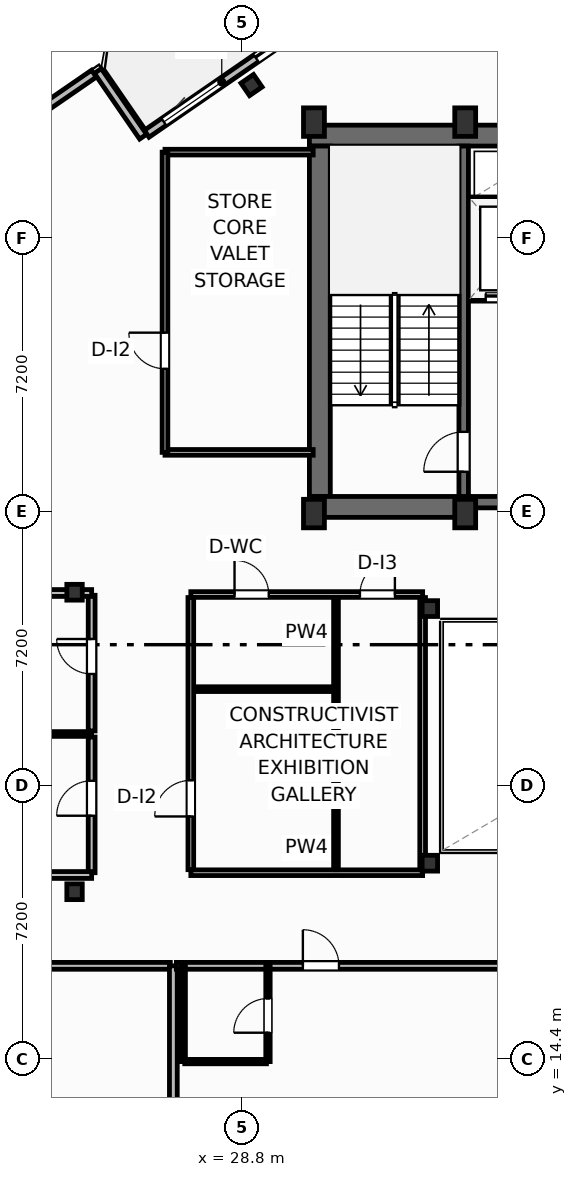
"""IFC4 building model, lengths in metres.
Left out: names, types, materials, properties, quantities, classifications, styles, units other than length and angle.
Written with IfcOpenShell. Run it as: python <this file> out.ifc"""

import sys

from ifc_helpers import new_model, si_unit, direction, frame, frame_2d, origin, origin_2d, place, context, subcontext, project, spatial, rectangle, i_section, extrude, element, fill, save


model = new_model("IFC4")
c1 = context("Model", 3, precision=1e-05, world=origin(), true_north=direction((0.0, 1.0)))
c2 = subcontext(c1, "Body", "Model", "MODEL_VIEW")
j1 = project(units=[si_unit("LENGTHUNIT", "METRE"), si_unit("PLANEANGLEUNIT", "RADIAN")], contexts=[c1])
p1 = place(None, origin())
s1 = spatial("IfcSite", under=j1, at=p1, CompositionType="ELEMENT")
p2 = place(p1, origin())
s2 = spatial("IfcBuilding", under=s1, at=p2, CompositionType="ELEMENT")
p3 = place(p2, frame((0.0, 0.0, 276.7)))
s3 = spatial("IfcBuildingStorey", under=s2, at=p3, CompositionType="ELEMENT", Elevation=276.7)
for number, where, z_axis, x_axis in (
    (1, (30.7, 28.75, 0.0), (0.0, 0.0, 1.0), (1.0, 0.0, 0.0)),
    (2, (34.68, 28.75, 0.0), (0.0, 0.0, 1.0), (1.0, 0.0, 0.0)),
    (3, (30.7, 39.05, 0.0), (0.0, 0.0, 1.0), (1.0, 0.0, 0.0)),
    (4, (34.68, 39.05, 0.0), (0.0, 0.0, 1.0), (1.0, 0.0, 0.0)),
):
    element("IfcColumn", number, at=place(p3, frame(where, z_axis=z_axis, x_axis=x_axis)), inside=s3, PredefinedType="COLUMN", context=c2, shape_type="SweptSolid", body=[
        extrude(rectangle(XDim=0.55, YDim=0.75, at=origin_2d()), origin(), (0.0, 0.0, 1.0), 3.7),
    ])
for number, where, z_axis, x_axis in (
    (5, (33.75, 19.55, 0.0), (0.0, 0.0, 1.0), (1.0, 0.0, 0.0)),
    (6, (33.75, 26.25, 0.0), (0.0, 0.0, 1.0), (1.0, 0.0, 0.0)),
    (7, (24.4, 18.8, 0.0), (0.0, 0.0, 1.0), (1.0, 0.0, 0.0)),
    (8, (24.4, 26.68, 0.0), (0.0, 0.0, 1.0), (1.0, 0.0, 0.0)),
):
    element("IfcColumn", number, at=place(p3, frame(where, z_axis=z_axis, x_axis=x_axis)), inside=s3, PredefinedType="COLUMN", context=c2, shape_type="SweptSolid", body=[
        extrude(i_section(OverallWidth=0.406, OverallDepth=0.416, WebThickness=0.03, FlangeThickness=0.048, FilletRadius=0.025, at=origin_2d()), origin(), (0.0, 0.0, 1.0), 3.7),
    ])
p4 = place(p3, frame((30.58, 38.695, 0.0), z_axis=(0.0, 0.0, 1.0), x_axis=(1.0, 0.0, 0.0)))
e9 = element("IfcWall", 9, at=p4, inside=s3, PredefinedType="SHEAR", context=c2, shape_type="SweptSolid", body=[
    extrude(rectangle(XDim=17.24, YDim=0.55, at=frame_2d((8.62, 0.0))), origin(), (0.0, 0.0, 1.0), 3.45),
])
p5 = place(p3, frame((30.855, 29.2, 0.0), z_axis=(0.0, 0.0, 1.0), x_axis=(0.0, 1.0, 0.0)))
e10 = element("IfcWall", 10, at=p5, inside=s3, PredefinedType="SHEAR", context=c2, shape_type="SweptSolid", body=[
    extrude(rectangle(XDim=9.22, YDim=0.55, at=frame_2d((4.61, 0.0))), origin(), (0.0, 0.0, 1.0), 3.45),
])
p6 = place(p3, frame((30.58, 28.925, 0.0), z_axis=(0.0, 0.0, 1.0), x_axis=(1.0, 0.0, 0.0)))
e11 = element("IfcWall", 11, at=p6, inside=s3, PredefinedType="SHEAR", context=c2, shape_type="SweptSolid", body=[
    extrude(rectangle(XDim=4.22, YDim=0.55, at=frame_2d((2.11, 0.0))), origin(), (0.0, 0.0, 1.0), 3.45),
])
p7 = place(p3, frame((34.8, 29.05, 0.0), z_axis=(0.0, 0.0, 1.0), x_axis=(1.0, 0.0, 0.0)))
e12 = element("IfcWall", 12, at=p7, inside=s3, PredefinedType="SHEAR", context=c2, shape_type="SweptSolid", body=[
    extrude(rectangle(XDim=8.8, YDim=0.3, at=frame_2d((4.4, 0.0))), origin(), (0.0, 0.0, 1.0), 3.45),
])
p8 = place(p7, frame((0.95, 0.0, 0.0)))
e13 = element("IfcOpeningElement", 13, at=p8, cuts=e12, PredefinedType="OPENING", context=c2, shape_type="SweptSolid", body=[
    extrude(rectangle(XDim=1.1, YDim=2.15, at=frame_2d((0.55, 1.075))), frame((0.0, 0.16, 0.0), z_axis=(0.0, -1.0, 0.0), x_axis=(1.0, 0.0, 0.0)), (0.0, 0.0, 1.0), 0.32),
])
p9 = place(p7, frame((6.75, 0.0, 0.0)))
e14 = element("IfcOpeningElement", 14, at=p9, cuts=e12, PredefinedType="OPENING", context=c2, shape_type="SweptSolid", body=[
    extrude(rectangle(XDim=1.1, YDim=2.15, at=frame_2d((0.55, 1.075))), frame((0.0, 0.16, 0.0), z_axis=(0.0, -1.0, 0.0), x_axis=(1.0, 0.0, 0.0)), (0.0, 0.0, 1.0), 0.32),
])
p10 = place(p7, frame((3.32, 0.0, 0.0)))
e15 = element("IfcOpeningElement", 15, at=p10, cuts=e12, PredefinedType="OPENING", context=c2, shape_type="SweptSolid", body=[
    extrude(rectangle(XDim=0.95, YDim=2.15, at=frame_2d((0.475, 1.075))), frame((0.0, 0.16, 0.0), z_axis=(0.0, -1.0, 0.0), x_axis=(1.0, 0.0, 0.0)), (0.0, 0.0, 1.0), 0.32),
])
p11 = place(p3, frame((34.64, 29.2, 0.0), z_axis=(0.0, 0.0, 1.0), x_axis=(0.0, 1.0, 0.0)))
e16 = element("IfcWall", 16, at=p11, inside=s3, PredefinedType="SHEAR", context=c2, shape_type="SweptSolid", body=[
    extrude(rectangle(XDim=9.22, YDim=0.25, at=frame_2d((4.61, 0.0))), origin(), (0.0, 0.0, 1.0), 3.45),
])
p12 = place(p11, frame((0.65, 0.0, 0.0)))
e17 = element("IfcOpeningElement", 17, at=p12, cuts=e16, PredefinedType="OPENING", context=c2, shape_type="SweptSolid", body=[
    extrude(rectangle(XDim=1.05, YDim=2.15, at=frame_2d((0.525, 1.075))), frame((0.0, 0.135, 0.0), z_axis=(0.0, -1.0, 0.0), x_axis=(1.0, 0.0, 0.0)), (0.0, 0.0, 1.0), 0.27),
])
p13 = place(p3, frame((29.057, 40.025, 0.0), z_axis=(0.0, 0.0, 1.0), x_axis=(0.823532597628, 0.567268949127, 0.0)))
e18 = element("IfcColumn", 18, at=p13, inside=s3, PredefinedType="COLUMN", context=c2, shape_type="SweptSolid", body=[
    extrude(i_section(OverallWidth=0.401, OverallDepth=0.399, WebThickness=0.025, FlangeThickness=0.04, FilletRadius=0.022, at=origin_2d()), origin(), (0.0, 0.0, 1.0), 3.7),
])
p14 = place(p3, frame((26.297, 38.743, 0.0), z_axis=(0.0, 0.0, 1.0), x_axis=(0.823534636215, 0.567265989598, 0.0)))
e19 = element("IfcWall", 19, at=p14, inside=s3, PredefinedType="SOLIDWALL", context=c2, shape_type="SweptSolid", body=[
    extrude(rectangle(XDim=6.0, YDim=0.22, at=frame_2d((3.0, 0.0))), origin(), (0.0, 0.0, 1.0), 2.73),
])
p15 = place(p14, frame((3.5, 0.0, 0.0)))
e20 = element("IfcOpeningElement", 20, at=p15, cuts=e19, PredefinedType="OPENING", context=c2, shape_type="SweptSolid", body=[
    extrude(rectangle(XDim=2.1, YDim=2.3, at=frame_2d((1.05, 1.15))), frame((0.0, 0.12, 0.0), z_axis=(0.0, -1.0, 0.0), x_axis=(1.0, 0.0, 0.0)), (0.0, 0.0, 1.0), 0.24),
])
p16 = place(p14, frame((0.55, 0.0, 0.75)))
e21 = element("IfcOpeningElement", 21, at=p16, cuts=e19, PredefinedType="OPENING", context=c2, shape_type="SweptSolid", body=[
    extrude(rectangle(XDim=1.85, YDim=1.75, at=frame_2d((0.925, 0.875))), frame((0.0, 0.12, 0.0), z_axis=(0.0, -1.0, 0.0), x_axis=(1.0, 0.0, 0.0)), (0.0, 0.0, 1.0), 0.24),
])
p17 = place(p3, frame((26.204, 38.667, 0.0), z_axis=(0.0, 0.0, 1.0), x_axis=(-0.567219383419, 0.823566737474, 0.0)))
e22 = element("IfcWall", 22, at=p17, inside=s3, PredefinedType="SOLIDWALL", context=c2, shape_type="SweptSolid", body=[
    extrude(rectangle(XDim=2.1, YDim=0.22, at=frame_2d((1.05, 0.0))), origin(), (0.0, 0.0, 1.0), 2.73),
])
p18 = place(p3, frame((24.91, 40.325, 0.0), z_axis=(0.0, 0.0, 1.0), x_axis=(-0.823521165086, -0.56728554596, 0.0)))
e23 = element("IfcWall", 23, at=p18, inside=s3, PredefinedType="SOLIDWALL", context=c2, shape_type="SweptSolid", body=[
    extrude(rectangle(XDim=8.035, YDim=0.22, at=frame_2d((4.018, 0.0))), origin(), (0.0, 0.0, 1.0), 2.73),
])
p19 = place(p18, frame((2.968, 0.0, 0.8)))
e24 = element("IfcOpeningElement", 24, at=p19, cuts=e23, PredefinedType="OPENING", context=c2, shape_type="SweptSolid", body=[
    extrude(rectangle(XDim=2.1, YDim=1.75, at=frame_2d((1.05, 0.875))), frame((0.0, 0.12, 0.0), z_axis=(0.0, -1.0, 0.0), x_axis=(1.0, 0.0, 0.0)), (0.0, 0.0, 1.0), 0.24),
])
p20 = place(p3, frame((5.038, 16.85, 0.0), z_axis=(0.0, 0.0, 1.0), x_axis=(1.0, 0.0, 0.0)))
e25 = element("IfcWall", 25, at=p20, inside=s3, PredefinedType="PARTITIONING", context=c2, shape_type="SweptSolid", body=[
    extrude(rectangle(XDim=21.882, YDim=0.18, at=frame_2d((10.941, 0.0))), origin(), (0.0, 0.0, 1.0), 2.739),
])
p21 = place(p20, frame((16.725, 0.0, 0.0)))
e26 = element("IfcOpeningElement", 26, at=p21, cuts=e25, PredefinedType="OPENING", context=c2, shape_type="SweptSolid", body=[
    extrude(rectangle(XDim=0.95, YDim=2.15, at=frame_2d((0.475, 1.075))), frame((0.0, 0.1, 0.0), z_axis=(0.0, -1.0, 0.0), x_axis=(1.0, 0.0, 0.0)), (0.0, 0.0, 1.0), 0.2),
])
p22 = place(p3, frame((27.0, -4.0, 0.0), z_axis=(0.0, 0.0, 1.0), x_axis=(0.0, 1.0, 0.0)))
e27 = element("IfcWall", 27, at=p22, inside=s3, PredefinedType="PARTITIONING", context=c2, shape_type="SweptSolid", body=[
    extrude(rectangle(XDim=20.85, YDim=0.205, at=frame_2d((10.425, 0.0))), origin(), (0.0, 0.0, 1.0), 3.45),
])
p23 = place(p3, frame((27.08, 16.85, 0.0), z_axis=(0.0, 0.0, 1.0), x_axis=(1.0, 0.0, 0.0)))
e28 = element("IfcWall", 28, at=p23, inside=s3, PredefinedType="PARTITIONING", context=c2, shape_type="SweptSolid", body=[
    extrude(rectangle(XDim=12.04, YDim=0.18, at=frame_2d((6.02, 0.0))), origin(), (0.0, 0.0, 1.0), 3.45),
])
p24 = place(p23, frame((3.328, 0.0, 0.0)))
e29 = element("IfcOpeningElement", 29, at=p24, cuts=e28, PredefinedType="OPENING", context=c2, shape_type="SweptSolid", body=[
    extrude(rectangle(XDim=0.95, YDim=2.15, at=frame_2d((0.475, 1.075))), frame((0.0, 0.1, 0.0), z_axis=(0.0, -1.0, 0.0), x_axis=(1.0, 0.0, 0.0)), (0.0, 0.0, 1.0), 0.2),
])
p25 = place(p3, frame((27.3, 14.33, 0.0), z_axis=(0.0, 0.0, 1.0), x_axis=(1.0, 0.0, 0.0)))
e30 = element("IfcWall", 30, at=p25, inside=s3, PredefinedType="PARTITIONING", context=c2, shape_type="SweptSolid", body=[
    extrude(rectangle(XDim=2.15, YDim=0.115, at=frame_2d((1.075, 0.0))), origin(), (0.0, 0.0, 1.0), 3.45),
])
p26 = place(p3, frame((29.49, 14.33, 0.0), z_axis=(0.0, 0.0, 1.0), x_axis=(0.0, 1.0, 0.0)))
e31 = element("IfcWall", 31, at=p26, inside=s3, PredefinedType="PARTITIONING", context=c2, shape_type="SweptSolid", body=[
    extrude(rectangle(XDim=2.52, YDim=0.115, at=frame_2d((1.26, 0.0))), origin(), (0.0, 0.0, 1.0), 3.45),
])
p27 = place(p26, frame((0.76, 0.0, 0.0)))
e32 = element("IfcOpeningElement", 32, at=p27, cuts=e31, PredefinedType="OPENING", context=c2, shape_type="SweptSolid", body=[
    extrude(rectangle(XDim=0.9, YDim=2.05, at=frame_2d((0.45, 1.025))), frame((0.0, 0.067, 0.0), z_axis=(0.0, -1.0, 0.0), x_axis=(1.0, 0.0, 0.0)), (0.0, 0.0, 1.0), 0.135),
])
p28 = place(p3, frame((27.26, 14.33, 0.0), z_axis=(0.0, 0.0, 1.0), x_axis=(0.0, 1.0, 0.0)))
e33 = element("IfcWall", 33, at=p28, inside=s3, PredefinedType="PARTITIONING", context=c2, shape_type="SweptSolid", body=[
    extrude(rectangle(XDim=2.52, YDim=0.115, at=frame_2d((1.26, 0.0))), origin(), (0.0, 0.0, 1.0), 3.45),
])
p29 = place(p3, frame((24.85, 19.3, 0.0), z_axis=(0.0, 0.0, 1.0), x_axis=(0.0, 1.0, 0.0)))
e34 = element("IfcWall", 34, at=p29, inside=s3, PredefinedType="PARTITIONING", context=c2, shape_type="SweptSolid", body=[
    extrude(rectangle(XDim=3.57, YDim=0.18, at=frame_2d((1.785, 0.0))), origin(), (0.0, 0.0, 1.0), 3.45),
])
p30 = place(p29, frame((1.5, 0.0, 0.0)))
e35 = element("IfcOpeningElement", 35, at=p30, cuts=e34, PredefinedType="OPENING", context=c2, shape_type="SweptSolid", body=[
    extrude(rectangle(XDim=0.92, YDim=2.05, at=frame_2d((0.46, 1.025))), frame((0.0, 0.1, 0.0), z_axis=(0.0, -1.0, 0.0), x_axis=(1.0, 0.0, 0.0)), (0.0, 0.0, 1.0), 0.2),
])
p31 = place(p3, frame((24.85, 23.03, 0.0), z_axis=(0.0, 0.0, 1.0), x_axis=(0.0, 1.0, 0.0)))
e36 = element("IfcWall", 36, at=p31, inside=s3, PredefinedType="PARTITIONING", context=c2, shape_type="SweptSolid", body=[
    extrude(rectangle(XDim=3.57, YDim=0.18, at=frame_2d((1.785, 0.0))), origin(), (0.0, 0.0, 1.0), 3.45),
])
p32 = place(p31, frame((1.5, 0.0, 0.0)))
e37 = element("IfcOpeningElement", 37, at=p32, cuts=e36, PredefinedType="OPENING", context=c2, shape_type="SweptSolid", body=[
    extrude(rectangle(XDim=0.92, YDim=2.05, at=frame_2d((0.46, 1.025))), frame((0.0, 0.1, 0.0), z_axis=(0.0, -1.0, 0.0), x_axis=(1.0, 0.0, 0.0)), (0.0, 0.0, 1.0), 0.2),
])
p33 = place(p3, frame((2.424, 22.95, 0.0), z_axis=(0.0, 0.0, 1.0), x_axis=(1.0, 0.0, 0.0)))
e38 = element("IfcWall", 38, at=p33, inside=s3, PredefinedType="PARTITIONING", context=c2, shape_type="SweptSolid", body=[
    extrude(rectangle(XDim=22.426, YDim=0.125, at=frame_2d((11.213, 0.0))), origin(), (0.0, 0.0, 1.0), 3.45),
])
p34 = place(p3, frame((3.392, 19.24, 0.0), z_axis=(0.0, 0.0, 1.0), x_axis=(1.0, 0.0, 0.0)))
e39 = element("IfcWall", 39, at=p34, inside=s3, PredefinedType="PARTITIONING", context=c2, shape_type="SweptSolid", body=[
    extrude(rectangle(XDim=21.458, YDim=0.18, at=frame_2d((10.729, 0.0))), origin(), (0.0, 0.0, 1.0), 3.45),
])
p35 = place(p3, frame((5.107, 26.66, 0.0), z_axis=(0.0, 0.0, 1.0), x_axis=(1.0, 0.0, 0.0)))
e40 = element("IfcWall", 40, at=p35, inside=s3, PredefinedType="PARTITIONING", context=c2, shape_type="SweptSolid", body=[
    extrude(rectangle(XDim=19.743, YDim=0.18, at=frame_2d((9.872, 0.0))), origin(), (0.0, 0.0, 1.0), 2.662),
])
p36 = place(p3, frame((34.8, 34.44, 0.0), z_axis=(0.0, 0.0, 1.0), x_axis=(1.0, 0.0, 0.0)))
e41 = element("IfcWall", 41, at=p36, inside=s3, PredefinedType="PARTITIONING", context=c2, shape_type="SweptSolid", body=[
    extrude(rectangle(XDim=2.18, YDim=0.2, at=frame_2d((1.09, 0.0))), origin(), (0.0, 0.0, 1.0), 3.45),
])
p37 = place(p36, frame((0.42, 0.0, 0.0)))
e42 = element("IfcOpeningElement", 42, at=p37, cuts=e41, PredefinedType="OPENING", context=c2, shape_type="SweptSolid", body=[
    extrude(rectangle(XDim=1.2, YDim=2.2, at=frame_2d((0.6, 1.1))), frame((0.0, 0.11, 0.0), z_axis=(0.0, -1.0, 0.0), x_axis=(1.0, 0.0, 0.0)), (0.0, 0.0, 1.0), 0.22),
])
p38 = place(p3, frame((34.8, 36.98, 0.0), z_axis=(0.0, 0.0, 1.0), x_axis=(1.0, 0.0, 0.0)))
e43 = element("IfcWall", 43, at=p38, inside=s3, PredefinedType="PARTITIONING", context=c2, shape_type="SweptSolid", body=[
    extrude(rectangle(XDim=2.18, YDim=0.2, at=frame_2d((1.09, 0.0))), origin(), (0.0, 0.0, 1.0), 3.45),
])
p39 = place(p3, frame((27.46, 19.3, 0.0), z_axis=(0.0, 0.0, 1.0), x_axis=(1.0, 0.0, 0.0)))
e44 = element("IfcWall", 44, at=p39, inside=s3, PredefinedType="PARTITIONING", context=c2, shape_type="SweptSolid", body=[
    extrude(rectangle(XDim=6.1, YDim=0.15, at=frame_2d((3.05, 0.0))), origin(), (0.0, 0.0, 1.0), 2.662),
])
p40 = place(p3, frame((27.46, 26.62, 0.0), z_axis=(0.0, 0.0, 1.0), x_axis=(1.0, 0.0, 0.0)))
e45 = element("IfcWall", 45, at=p40, inside=s3, PredefinedType="PARTITIONING", context=c2, shape_type="SweptSolid", body=[
    extrude(rectangle(XDim=6.1, YDim=0.15, at=frame_2d((3.05, 0.0))), origin(), (0.0, 0.0, 1.0), 2.662),
])
p41 = place(p40, frame((1.15, 0.0, 0.0)))
e46 = element("IfcOpeningElement", 46, at=p41, cuts=e45, PredefinedType="OPENING", context=c2, shape_type="SweptSolid", body=[
    extrude(rectangle(XDim=0.9, YDim=2.05, at=frame_2d((0.45, 1.025))), frame((0.0, 0.085, 0.0), z_axis=(0.0, -1.0, 0.0), x_axis=(1.0, 0.0, 0.0)), (0.0, 0.0, 1.0), 0.17),
])
p42 = place(p40, frame((4.45, 0.0, 0.0)))
e47 = element("IfcOpeningElement", 47, at=p42, cuts=e45, PredefinedType="OPENING", context=c2, shape_type="SweptSolid", body=[
    extrude(rectangle(XDim=0.92, YDim=2.05, at=frame_2d((0.46, 1.025))), frame((0.0, 0.085, 0.0), z_axis=(0.0, -1.0, 0.0), x_axis=(1.0, 0.0, 0.0)), (0.0, 0.0, 1.0), 0.17),
])
p43 = place(p3, frame((31.28, 19.38, 0.0), z_axis=(0.0, 0.0, 1.0), x_axis=(0.0, 1.0, 0.0)))
e48 = element("IfcWall", 48, at=p43, inside=s3, PredefinedType="PARTITIONING", context=c2, shape_type="SweptSolid", body=[
    extrude(rectangle(XDim=7.16, YDim=0.125, at=frame_2d((3.58, 0.0))), origin(), (0.0, 0.0, 1.0), 3.45),
])
p44 = place(p3, frame((27.52, 24.13, 0.0), z_axis=(0.0, 0.0, 1.0), x_axis=(1.0, 0.0, 0.0)))
e49 = element("IfcWall", 49, at=p44, inside=s3, PredefinedType="PARTITIONING", context=c2, shape_type="SweptSolid", body=[
    extrude(rectangle(XDim=3.7, YDim=0.125, at=frame_2d((1.85, 0.0))), origin(), (0.0, 0.0, 1.0), 3.45),
])
p45 = place(p3, frame((27.46, 19.38, 0.0), z_axis=(0.0, 0.0, 1.0), x_axis=(0.0, 1.0, 0.0)))
e50 = element("IfcWall", 50, at=p45, inside=s3, PredefinedType="PARTITIONING", context=c2, shape_type="SweptSolid", body=[
    extrude(rectangle(XDim=7.16, YDim=0.15, at=frame_2d((3.58, 0.0))), origin(), (0.0, 0.0, 1.0), 3.45),
])
p46 = place(p45, frame((1.4, 0.0, 0.0)))
e51 = element("IfcOpeningElement", 51, at=p46, cuts=e50, PredefinedType="OPENING", context=c2, shape_type="SweptSolid", body=[
    extrude(rectangle(XDim=0.95, YDim=2.05, at=frame_2d((0.475, 1.025))), frame((0.0, 0.085, 0.0), z_axis=(0.0, -1.0, 0.0), x_axis=(1.0, 0.0, 0.0)), (0.0, 0.0, 1.0), 0.17),
])
p47 = place(p3, frame((33.56, 19.38, 0.0), z_axis=(0.0, 0.0, 1.0), x_axis=(0.0, 1.0, 0.0)))
e52 = element("IfcWall", 52, at=p47, inside=s3, PredefinedType="PARTITIONING", context=c2, shape_type="SweptSolid", body=[
    extrude(rectangle(XDim=7.16, YDim=0.15, at=frame_2d((3.58, 0.0))), origin(), (0.0, 0.0, 1.0), 2.824),
])
for number, where, z_axis, x_axis in (
    (53, (26.78, 30.36, 0.0), (0.0, 0.0, 1.0), (1.0, 0.0, 0.0)),
    (54, (26.78, 38.26, 0.0), (0.0, 0.0, 1.0), (1.0, 0.0, 0.0)),
):
    element("IfcWall", number, at=place(p3, frame(where, z_axis=z_axis, x_axis=x_axis)), inside=s3, PredefinedType="PARTITIONING", context=c2, shape_type="SweptSolid", body=[
        extrude(rectangle(XDim=3.9, YDim=0.15, at=frame_2d((1.95, 0.0))), origin(), (0.0, 0.0, 1.0), 3.45),
    ])
p48 = place(p3, frame((26.78, 30.36, 0.0), z_axis=(0.0, 0.0, 1.0), x_axis=(0.0, 1.0, 0.0)))
e55 = element("IfcWall", 55, at=p48, inside=s3, PredefinedType="PARTITIONING", context=c2, shape_type="SweptSolid", body=[
    extrude(rectangle(XDim=7.9, YDim=0.15, at=frame_2d((3.95, 0.0))), origin(), (0.0, 0.0, 1.0), 3.45),
])
p49 = place(p48, frame((2.2, 0.0, 0.0)))
e56 = element("IfcOpeningElement", 56, at=p49, cuts=e55, PredefinedType="OPENING", context=c2, shape_type="SweptSolid", body=[
    extrude(rectangle(XDim=0.95, YDim=2.05, at=frame_2d((0.475, 1.025))), frame((0.0, 0.085, 0.0), z_axis=(0.0, -1.0, 0.0), x_axis=(1.0, 0.0, 0.0)), (0.0, 0.0, 1.0), 0.17),
])
p50 = place(p15, origin())
e57 = element("IfcDoor", 57, at=p50, inside=s3, OperationType="SLIDING_TO_LEFT", PredefinedType="DOOR", context=c2, shape_type="SweptSolid", body=[
    extrude(rectangle(XDim=2.1, YDim=2.3, at=frame_2d((1.05, 1.15))), frame((0.0, 0.025, 0.0), z_axis=(0.0, -1.0, 0.0), x_axis=(1.0, 0.0, 0.0)), (0.0, 0.0, 1.0), 0.05),
])
fill(e20, e57)
p51 = place(p16, origin())
e58 = element("IfcWindow", 58, at=p51, inside=s3, PartitioningType="SINGLE_PANEL", PredefinedType="WINDOW", context=c2, shape_type="SweptSolid", body=[
    extrude(rectangle(XDim=1.85, YDim=1.75, at=frame_2d((0.925, 0.875))), frame((0.0, 0.03, 0.0), z_axis=(0.0, -1.0, 0.0), x_axis=(1.0, 0.0, 0.0)), (0.0, 0.0, 1.0), 0.06),
])
fill(e21, e58)
p52 = place(p24, origin())
e59 = element("IfcDoor", 59, at=p52, inside=s3, OperationType="SINGLE_SWING_LEFT", PredefinedType="DOOR", context=c2, shape_type="SweptSolid", body=[
    extrude(rectangle(XDim=0.95, YDim=2.15, at=frame_2d((0.475, 1.075))), frame((0.0, 0.025, 0.0), z_axis=(0.0, -1.0, 0.0), x_axis=(1.0, 0.0, 0.0)), (0.0, 0.0, 1.0), 0.05),
])
fill(e29, e59)
p53 = place(p27, origin())
e60 = element("IfcDoor", 60, at=p53, inside=s3, OperationType="SINGLE_SWING_LEFT", PredefinedType="DOOR", context=c2, shape_type="SweptSolid", body=[
    extrude(rectangle(XDim=0.9, YDim=2.05, at=frame_2d((0.45, 1.025))), frame((0.0, 0.025, 0.0), z_axis=(0.0, -1.0, 0.0), x_axis=(1.0, 0.0, 0.0)), (0.0, 0.0, 1.0), 0.05),
])
fill(e32, e60)
p54 = place(p30, origin())
e61 = element("IfcDoor", 61, at=p54, inside=s3, OperationType="SINGLE_SWING_LEFT", PredefinedType="DOOR", context=c2, shape_type="SweptSolid", body=[
    extrude(rectangle(XDim=0.92, YDim=2.05, at=frame_2d((0.46, 1.025))), frame((0.0, 0.025, 0.0), z_axis=(0.0, -1.0, 0.0), x_axis=(1.0, 0.0, 0.0)), (0.0, 0.0, 1.0), 0.05),
])
fill(e35, e61)
p55 = place(p32, origin())
e62 = element("IfcDoor", 62, at=p55, inside=s3, OperationType="SINGLE_SWING_RIGHT", PredefinedType="DOOR", context=c2, shape_type="SweptSolid", body=[
    extrude(rectangle(XDim=0.92, YDim=2.05, at=frame_2d((0.46, 1.025))), frame((0.0, 0.025, 0.0), z_axis=(0.0, -1.0, 0.0), x_axis=(1.0, 0.0, 0.0)), (0.0, 0.0, 1.0), 0.05),
])
fill(e37, e62)
p56 = place(p12, origin())
e63 = element("IfcDoor", 63, at=p56, inside=s3, OperationType="SINGLE_SWING_LEFT", PredefinedType="DOOR", context=c2, shape_type="SweptSolid", body=[
    extrude(rectangle(XDim=1.05, YDim=2.15, at=frame_2d((0.525, 1.075))), frame((0.0, 0.025, 0.0), z_axis=(0.0, -1.0, 0.0), x_axis=(1.0, 0.0, 0.0)), (0.0, 0.0, 1.0), 0.05),
])
fill(e17, e63)
p57 = place(p37, origin())
e64 = element("IfcDoor", 64, at=p57, inside=s3, OperationType="SLIDING_TO_LEFT", PredefinedType="DOOR", context=c2, shape_type="SweptSolid", body=[
    extrude(rectangle(XDim=1.2, YDim=2.2, at=frame_2d((0.6, 1.1))), frame((0.0, 0.025, 0.0), z_axis=(0.0, -1.0, 0.0), x_axis=(1.0, 0.0, 0.0)), (0.0, 0.0, 1.0), 0.05),
])
fill(e42, e64)
p58 = place(p41, origin())
e65 = element("IfcDoor", 65, at=p58, inside=s3, OperationType="SINGLE_SWING_LEFT", PredefinedType="DOOR", context=c2, shape_type="SweptSolid", body=[
    extrude(rectangle(XDim=0.9, YDim=2.05, at=frame_2d((0.45, 1.025))), frame((0.0, 0.025, 0.0), z_axis=(0.0, -1.0, 0.0), x_axis=(1.0, 0.0, 0.0)), (0.0, 0.0, 1.0), 0.05),
])
fill(e46, e65)
p59 = place(p42, origin())
e66 = element("IfcDoor", 66, at=p59, inside=s3, OperationType="SINGLE_SWING_RIGHT", PredefinedType="DOOR", context=c2, shape_type="SweptSolid", body=[
    extrude(rectangle(XDim=0.92, YDim=2.05, at=frame_2d((0.46, 1.025))), frame((0.0, 0.025, 0.0), z_axis=(0.0, -1.0, 0.0), x_axis=(1.0, 0.0, 0.0)), (0.0, 0.0, 1.0), 0.05),
])
fill(e47, e66)
p60 = place(p46, origin())
e67 = element("IfcDoor", 67, at=p60, inside=s3, OperationType="SINGLE_SWING_LEFT", PredefinedType="DOOR", context=c2, shape_type="SweptSolid", body=[
    extrude(rectangle(XDim=0.95, YDim=2.05, at=frame_2d((0.475, 1.025))), frame((0.0, 0.025, 0.0), z_axis=(0.0, -1.0, 0.0), x_axis=(1.0, 0.0, 0.0)), (0.0, 0.0, 1.0), 0.05),
])
fill(e51, e67)
p61 = place(p49, origin())
e68 = element("IfcDoor", 68, at=p61, inside=s3, OperationType="SINGLE_SWING_RIGHT", PredefinedType="DOOR", context=c2, shape_type="SweptSolid", body=[
    extrude(rectangle(XDim=0.95, YDim=2.05, at=frame_2d((0.475, 1.025))), frame((0.0, 0.025, 0.0), z_axis=(0.0, -1.0, 0.0), x_axis=(1.0, 0.0, 0.0)), (0.0, 0.0, 1.0), 0.05),
])
fill(e56, e68)
save(model, sys.argv[1])
